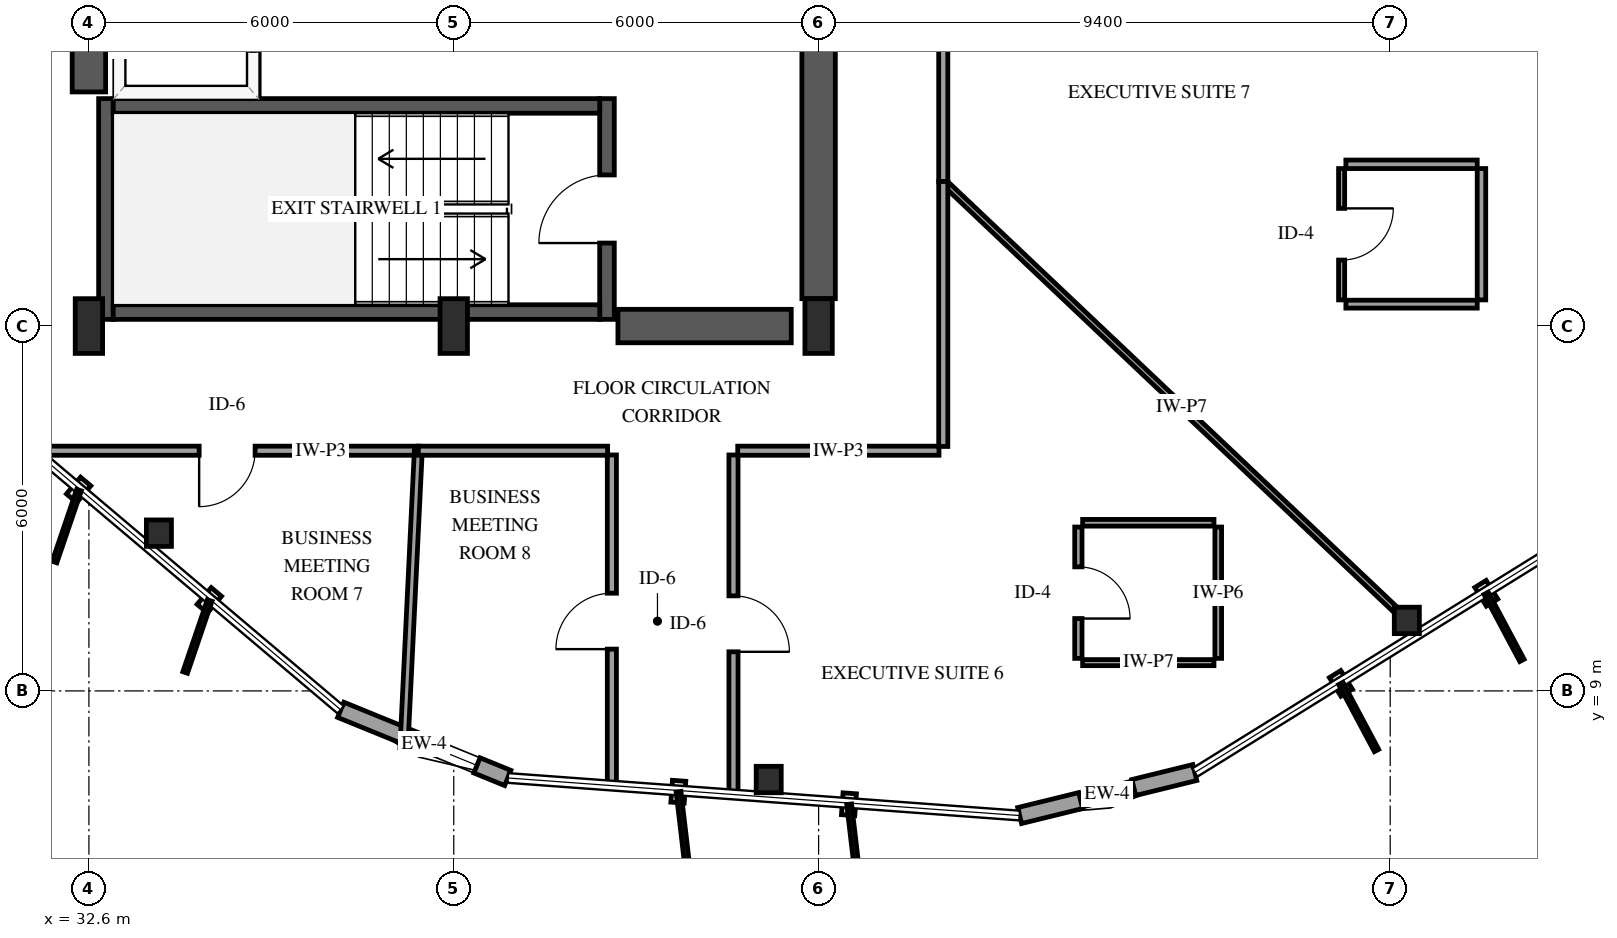
"""IFC4 building model, lengths in metres.
Left out: names, types, materials, properties, quantities, classifications, styles, units other than length and angle.
Written with IfcOpenShell. Run it as: python <this file> out.ifc"""

import sys

from ifc_helpers import new_model, si_unit, direction, frame, frame_2d, origin, origin_2d, place, context, subcontext, project, spatial, rectangle, i_section, extrude, element, fill, save


model = new_model("IFC4")
c1 = context("Model", 3, precision=1e-05, world=origin(), true_north=direction((0.0, 1.0)))
c2 = subcontext(c1, "Body", "Model", "MODEL_VIEW")
j1 = project(units=[si_unit("LENGTHUNIT", "METRE"), si_unit("PLANEANGLEUNIT", "RADIAN")], contexts=[c1])
p1 = place(None, origin())
s1 = spatial("IfcSite", under=j1, at=p1, CompositionType="ELEMENT")
p2 = place(p1, origin())
s2 = spatial("IfcBuilding", under=s1, at=p2, CompositionType="ELEMENT")
p3 = place(p2, frame((0.0, 0.0, 153.4)))
s3 = spatial("IfcBuildingStorey", under=s2, at=p3, CompositionType="ELEMENT", Elevation=153.4)
p4 = place(p3, frame((32.88, 15.11, 0.0), z_axis=(0.0, 0.0, 1.0), x_axis=(0.0, 1.0, 0.0)))
e1 = element("IfcWall", 1, at=p4, inside=s3, PredefinedType="SHEAR", context=c2, shape_type="SweptSolid", body=[
    extrude(rectangle(XDim=3.63, YDim=0.24, at=frame_2d((1.815, 0.0))), origin(), (0.0, 0.0, 1.0), 3.6),
])
p5 = place(p3, frame((41.12, 15.11, 0.0), z_axis=(0.0, 0.0, 1.0), x_axis=(0.0, 1.0, 0.0)))
e2 = element("IfcWall", 2, at=p5, inside=s3, PredefinedType="SHEAR", context=c2, shape_type="SweptSolid", body=[
    extrude(rectangle(XDim=3.63, YDim=0.24, at=frame_2d((1.815, 0.0))), origin(), (0.0, 0.0, 1.0), 3.6),
])
p6 = place(p5, frame((1.255, 0.0, 0.0)))
e3 = element("IfcOpeningElement", 3, at=p6, cuts=e2, PredefinedType="OPENING", context=c2, shape_type="SweptSolid", body=[
    extrude(rectangle(XDim=1.12, YDim=2.15, at=frame_2d((0.56, 1.075))), frame((0.0, 0.13, 0.0), z_axis=(0.0, -1.0, 0.0), x_axis=(1.0, 0.0, 0.0)), (0.0, 0.0, 1.0), 0.26),
])
for number, where, z_axis, x_axis in (
    (4, (33.0, 15.23, 0.0), (0.0, 0.0, 1.0), (1.0, 0.0, 0.0)),
    (5, (33.0, 18.62, 0.0), (0.0, 0.0, 1.0), (1.0, 0.0, 0.0)),
):
    element("IfcWall", number, at=place(p3, frame(where, z_axis=z_axis, x_axis=x_axis)), inside=s3, PredefinedType="SHEAR", context=c2, shape_type="SweptSolid", body=[
        extrude(rectangle(XDim=8.0, YDim=0.24, at=frame_2d((4.0, 0.0))), origin(), (0.0, 0.0, 1.0), 3.6),
    ])
p7 = place(p3, frame((32.6, 18.85, 0.0), z_axis=(0.0, 0.0, 1.0), x_axis=(0.0, 1.0, 0.0)))
e6 = element("IfcWall", 6, at=p7, inside=s3, PredefinedType="SHEAR", context=c2, shape_type="SweptSolid", body=[
    extrude(rectangle(XDim=12.3, YDim=0.55, at=frame_2d((6.15, 0.0))), origin(), (0.0, 0.0, 1.0), 3.6),
])
p8 = place(p3, frame((41.3, 15.0, 0.0), z_axis=(0.0, 0.0, 1.0), x_axis=(1.0, 0.0, 0.0)))
e7 = element("IfcWall", 7, at=p8, inside=s3, PredefinedType="SHEAR", context=c2, shape_type="SweptSolid", body=[
    extrude(rectangle(XDim=2.85, YDim=0.55, at=frame_2d((1.425, 0.0))), origin(), (0.0, 0.0, 1.0), 3.6),
])
p9 = place(p3, frame((44.6, 15.45, 0.0), z_axis=(0.0, 0.0, 1.0), x_axis=(0.0, 1.0, 0.0)))
e8 = element("IfcWall", 8, at=p9, inside=s3, PredefinedType="SHEAR", context=c2, shape_type="SweptSolid", body=[
    extrude(rectangle(XDim=6.35, YDim=0.55, at=frame_2d((3.175, 0.0))), origin(), (0.0, 0.0, 1.0), 3.6),
])
for number, where, z_axis, x_axis in (
    (9, (32.6, 15.0, 0.0), (0.0, 0.0, 1.0), (1.0, 0.0, 0.0)),
    (10, (38.6, 15.0, 0.0), (0.0, 0.0, 1.0), (1.0, 0.0, 0.0)),
    (11, (44.6, 15.0, 0.0), (0.0, 0.0, 1.0), (1.0, 0.0, 0.0)),
):
    element("IfcColumn", number, at=place(p3, frame(where, z_axis=z_axis, x_axis=x_axis)), inside=s3, PredefinedType="PILASTER", context=c2, shape_type="SweptSolid", body=[
        extrude(rectangle(XDim=0.45, YDim=0.9, at=origin_2d()), origin(), (0.0, 0.0, 1.0), 3.6),
    ])
for number, where, z_axis, x_axis in (
    (12, (33.751, 11.594, 0.0), (0.0, 0.0, 1.0), (1.0, 0.0, 0.0)),
    (13, (43.779, 7.542, 0.0), (0.0, 0.0, 1.0), (1.0, 0.0, 0.0)),
    (14, (54.274, 10.159, 0.0), (0.0, 0.0, 1.0), (1.0, 0.0, 0.0)),
):
    element("IfcColumn", number, at=place(p3, frame(where, z_axis=z_axis, x_axis=x_axis)), inside=s3, PredefinedType="COLUMN", context=c2, shape_type="SweptSolid", body=[
        extrude(i_section(OverallWidth=0.412, OverallDepth=0.435, WebThickness=0.036, FlangeThickness=0.057, FilletRadius=0.038, at=origin_2d()), origin(), (0.0, 0.0, 1.0), 3.6),
    ])
p10 = place(p3, frame((36.742, 8.689, 0.0), z_axis=(0.0, 0.0, 1.0), x_axis=(0.925871735267, -0.377837967699, 0.0)))
e15 = element("IfcWall", 15, at=p10, inside=s3, PredefinedType="SOLIDWALL", context=c2, shape_type="SweptSolid", body=[
    extrude(rectangle(XDim=2.967, YDim=0.27, at=frame_2d((1.483, 0.0))), origin(), (0.0, 0.0, 1.0), 2.679),
])
p11 = place(p10, frame((1.519, 0.0, 0.75)))
e16 = element("IfcOpeningElement", 16, at=p11, cuts=e15, PredefinedType="OPENING", context=c2, shape_type="SweptSolid", body=[
    extrude(rectangle(XDim=0.9, YDim=1.5, at=frame_2d((0.45, 0.75))), frame((0.0, 0.145, 0.0), z_axis=(0.0, -1.0, 0.0), x_axis=(1.0, 0.0, 0.0)), (0.0, 0.0, 1.0), 0.29),
])
p12 = place(p3, frame((47.906, 6.95, 0.0), z_axis=(0.0, 0.0, 1.0), x_axis=(0.971145785541, 0.23848661016, 0.0)))
e17 = element("IfcWall", 17, at=p12, inside=s3, PredefinedType="SOLIDWALL", context=c2, shape_type="SweptSolid", body=[
    extrude(rectangle(XDim=2.967, YDim=0.27, at=frame_2d((1.483, 0.0))), origin(), (0.0, 0.0, 1.0), 2.679),
])
p13 = place(p12, frame((1.033, 0.0, 0.75)))
e18 = element("IfcOpeningElement", 18, at=p13, cuts=e17, PredefinedType="OPENING", context=c2, shape_type="SweptSolid", body=[
    extrude(rectangle(XDim=0.9, YDim=1.5, at=frame_2d((0.45, 0.75))), frame((0.0, 0.145, 0.0), z_axis=(0.0, -1.0, 0.0), x_axis=(1.0, 0.0, 0.0)), (0.0, 0.0, 1.0), 0.29),
])
p14 = place(p3, frame((35.3, 18.79, 0.0), z_axis=(0.0, 0.0, 1.0), x_axis=(0.0, 1.0, 0.0)))
e19 = element("IfcWall", 19, at=p14, inside=s3, PredefinedType="SOLIDWALL", context=c2, shape_type="SweptSolid", body=[
    extrude(rectangle(XDim=2.55, YDim=0.2, at=frame_2d((1.275, 0.0))), origin(), (0.0, 0.0, 1.0), 3.3),
])
p15 = place(p14, frame((0.725, 0.0, 0.0)))
e20 = element("IfcOpeningElement", 20, at=p15, cuts=e19, PredefinedType="OPENING", context=c2, shape_type="SweptSolid", body=[
    extrude(rectangle(XDim=1.1, YDim=2.15, at=frame_2d((0.55, 1.075))), frame((0.0, 0.11, 0.0), z_axis=(0.0, -1.0, 0.0), x_axis=(1.0, 0.0, 0.0)), (0.0, 0.0, 1.0), 0.22),
])
p16 = place(p3, frame((46.65, 22.668, 0.0), z_axis=(0.0, 0.0, 1.0), x_axis=(0.960493218243, -0.27830339148, 0.0)))
e21 = element("IfcWall", 21, at=p16, inside=s3, PredefinedType="PARTITIONING", context=c2, shape_type="SweptSolid", body=[
    extrude(rectangle(XDim=15.465, YDim=0.12, at=frame_2d((7.732, 0.0))), origin(), (0.0, 0.0, 1.0), 3.3),
])
p17 = place(p3, frame((46.65, 17.377, 0.0), z_axis=(0.0, 0.0, 1.0), x_axis=(0.726165374711, -0.687520071395, 0.0)))
e22 = element("IfcWall", 22, at=p17, inside=s3, PredefinedType="PARTITIONING", context=c2, shape_type="SweptSolid", body=[
    extrude(rectangle(XDim=10.797, YDim=0.1, at=frame_2d((5.398, 0.0))), origin(), (0.0, 0.0, 1.0), 2.595),
])
p18 = place(p3, frame((38.017, 12.95, 0.0), z_axis=(0.0, 0.0, 1.0), x_axis=(-1.0, 0.0, 0.0)))
e23 = element("IfcWall", 23, at=p18, inside=s3, PredefinedType="PARTITIONING", context=c2, shape_type="SweptSolid", body=[
    extrude(rectangle(XDim=6.317, YDim=0.15, at=frame_2d((3.159, 0.0))), origin(), (0.0, 0.0, 1.0), 3.3),
])
p19 = place(p18, frame((2.684, 0.0, 0.0)))
e24 = element("IfcOpeningElement", 24, at=p19, cuts=e23, PredefinedType="OPENING", context=c2, shape_type="SweptSolid", body=[
    extrude(rectangle(XDim=0.92, YDim=2.12, at=frame_2d((0.46, 1.06))), frame((0.0, 0.085, 0.0), z_axis=(0.0, -1.0, 0.0), x_axis=(1.0, 0.0, 0.0)), (0.0, 0.0, 1.0), 0.17),
])
p20 = place(p3, frame((43.2, 12.88, 0.0), z_axis=(0.0, 0.0, 1.0), x_axis=(0.0, -1.0, 0.0)))
e25 = element("IfcWall", 25, at=p20, inside=s3, PredefinedType="PARTITIONING", context=c2, shape_type="SweptSolid", body=[
    extrude(rectangle(XDim=5.584, YDim=0.15, at=frame_2d((2.792, 0.0))), origin(), (0.0, 0.0, 1.0), 2.595),
])
p21 = place(p20, frame((2.317, 0.0, 0.0)))
e26 = element("IfcOpeningElement", 26, at=p21, cuts=e25, PredefinedType="OPENING", context=c2, shape_type="SweptSolid", body=[
    extrude(rectangle(XDim=0.92, YDim=2.12, at=frame_2d((0.46, 1.06))), frame((0.0, 0.085, 0.0), z_axis=(0.0, -1.0, 0.0), x_axis=(1.0, 0.0, 0.0)), (0.0, 0.0, 1.0), 0.17),
])
p22 = place(p3, frame((41.2, 7.443, 0.0), z_axis=(0.0, 0.0, 1.0), x_axis=(0.0, 1.0, 0.0)))
e27 = element("IfcWall", 27, at=p22, inside=s3, PredefinedType="PARTITIONING", context=c2, shape_type="SweptSolid", body=[
    extrude(rectangle(XDim=5.437, YDim=0.15, at=frame_2d((2.718, 0.0))), origin(), (0.0, 0.0, 1.0), 3.3),
])
p23 = place(p22, frame((2.244, 0.0, 0.0)))
e28 = element("IfcOpeningElement", 28, at=p23, cuts=e27, PredefinedType="OPENING", context=c2, shape_type="SweptSolid", body=[
    extrude(rectangle(XDim=0.92, YDim=2.12, at=frame_2d((0.46, 1.06))), frame((0.0, 0.085, 0.0), z_axis=(0.0, -1.0, 0.0), x_axis=(1.0, 0.0, 0.0)), (0.0, 0.0, 1.0), 0.17),
])
p24 = place(p3, frame((46.65, 22.668, 0.0), z_axis=(0.0, 0.0, 1.0), x_axis=(0.0, -1.0, 0.0)))
e29 = element("IfcWall", 29, at=p24, inside=s3, PredefinedType="PARTITIONING", context=c2, shape_type="SweptSolid", body=[
    extrude(rectangle(XDim=5.291, YDim=0.15, at=frame_2d((2.646, 0.0))), origin(), (0.0, 0.0, 1.0), 3.3),
])
p25 = place(p24, frame((2.171, 0.0, 0.0)))
e30 = element("IfcOpeningElement", 30, at=p25, cuts=e29, PredefinedType="OPENING", context=c2, shape_type="SweptSolid", body=[
    extrude(rectangle(XDim=0.92, YDim=2.12, at=frame_2d((0.46, 1.06))), frame((0.0, 0.085, 0.0), z_axis=(0.0, -1.0, 0.0), x_axis=(1.0, 0.0, 0.0)), (0.0, 0.0, 1.0), 0.17),
])
p26 = place(p3, frame((38.017, 12.95, 0.0), z_axis=(0.0, 0.0, 1.0), x_axis=(-0.048422834173, -0.998826926515, 0.0)))
e31 = element("IfcWall", 31, at=p26, inside=s3, PredefinedType="PARTITIONING", context=c2, shape_type="SweptSolid", body=[
    extrude(rectangle(XDim=4.896, YDim=0.13, at=frame_2d((2.448, 0.0))), origin(), (0.0, 0.0, 1.0), 2.678),
])
p27 = place(p3, frame((46.65, 17.377, 0.0), z_axis=(0.0, 0.0, 1.0), x_axis=(0.0, -1.0, 0.0)))
e32 = element("IfcWall", 32, at=p27, inside=s3, PredefinedType="PARTITIONING", context=c2, shape_type="SweptSolid", body=[
    extrude(rectangle(XDim=4.357, YDim=0.15, at=frame_2d((2.178, 0.0))), origin(), (0.0, 0.0, 1.0), 3.3),
])
p28 = place(p3, frame((46.58, 12.95, 0.0), z_axis=(0.0, 0.0, 1.0), x_axis=(-1.0, 0.0, 0.0)))
e33 = element("IfcWall", 33, at=p28, inside=s3, PredefinedType="PARTITIONING", context=c2, shape_type="SweptSolid", body=[
    extrude(rectangle(XDim=3.31, YDim=0.15, at=frame_2d((1.655, 0.0))), origin(), (0.0, 0.0, 1.0), 3.3),
])
p29 = place(p3, frame((41.13, 12.95, 0.0), z_axis=(0.0, 0.0, 1.0), x_axis=(-1.0, 0.0, 0.0)))
e34 = element("IfcWall", 34, at=p29, inside=s3, PredefinedType="PARTITIONING", context=c2, shape_type="SweptSolid", body=[
    extrude(rectangle(XDim=3.113, YDim=0.15, at=frame_2d((1.556, 0.0))), origin(), (0.0, 0.0, 1.0), 3.3),
])
p30 = place(p3, frame((48.872, 11.695, 0.0), z_axis=(0.0, 0.0, 1.0), x_axis=(0.0, -1.0, 0.0)))
e35 = element("IfcWall", 35, at=p30, inside=s3, PredefinedType="PARTITIONING", context=c2, shape_type="SweptSolid", body=[
    extrude(rectangle(XDim=2.16, YDim=0.12, at=frame_2d((1.08, 0.0))), origin(), (0.0, 0.0, 1.0), 3.3),
])
p31 = place(p30, frame((0.655, 0.0, 0.0)))
e36 = element("IfcOpeningElement", 36, at=p31, cuts=e35, PredefinedType="OPENING", context=c2, shape_type="SweptSolid", body=[
    extrude(rectangle(XDim=0.85, YDim=2.1, at=frame_2d((0.425, 1.05))), frame((0.0, 0.07, 0.0), z_axis=(0.0, -1.0, 0.0), x_axis=(1.0, 0.0, 0.0)), (0.0, 0.0, 1.0), 0.14),
])
p32 = place(p3, frame((51.172, 9.535, 0.0), z_axis=(0.0, 0.0, 1.0), x_axis=(0.0, 1.0, 0.0)))
e37 = element("IfcWall", 37, at=p32, inside=s3, PredefinedType="PARTITIONING", context=c2, shape_type="SweptSolid", body=[
    extrude(rectangle(XDim=2.16, YDim=0.11, at=frame_2d((1.08, 0.0))), origin(), (0.0, 0.0, 1.0), 3.3),
])
p33 = place(p3, frame((53.201, 17.59, 0.0), z_axis=(0.0, 0.0, 1.0), x_axis=(0.0, -1.0, 0.0)))
e38 = element("IfcWall", 38, at=p33, inside=s3, PredefinedType="PARTITIONING", context=c2, shape_type="SweptSolid", body=[
    extrude(rectangle(XDim=2.16, YDim=0.1, at=frame_2d((1.08, 0.0))), origin(), (0.0, 0.0, 1.0), 3.3),
])
p34 = place(p33, frame((0.655, 0.0, 0.0)))
e39 = element("IfcOpeningElement", 39, at=p34, cuts=e38, PredefinedType="OPENING", context=c2, shape_type="SweptSolid", body=[
    extrude(rectangle(XDim=0.85, YDim=2.1, at=frame_2d((0.425, 1.05))), frame((0.0, 0.06, 0.0), z_axis=(0.0, -1.0, 0.0), x_axis=(1.0, 0.0, 0.0)), (0.0, 0.0, 1.0), 0.12),
])
p35 = place(p3, frame((55.501, 15.43, 0.0), z_axis=(0.0, 0.0, 1.0), x_axis=(0.0, 1.0, 0.0)))
e40 = element("IfcWall", 40, at=p35, inside=s3, PredefinedType="PARTITIONING", context=c2, shape_type="SweptSolid", body=[
    extrude(rectangle(XDim=2.16, YDim=0.14, at=frame_2d((1.08, 0.0))), origin(), (0.0, 0.0, 1.0), 3.3),
])
p36 = place(p3, frame((51.102, 11.765, 0.0), z_axis=(0.0, 0.0, 1.0), x_axis=(-1.0, 0.0, 0.0)))
e41 = element("IfcWall", 41, at=p36, inside=s3, PredefinedType="PARTITIONING", context=c2, shape_type="SweptSolid", body=[
    extrude(rectangle(XDim=2.16, YDim=0.11, at=frame_2d((1.08, 0.0))), origin(), (0.0, 0.0, 1.0), 3.3),
])
p37 = place(p3, frame((48.942, 9.465, 0.0), z_axis=(0.0, 0.0, 1.0), x_axis=(1.0, 0.0, 0.0)))
e42 = element("IfcWall", 42, at=p37, inside=s3, PredefinedType="PARTITIONING", context=c2, shape_type="SweptSolid", body=[
    extrude(rectangle(XDim=2.16, YDim=0.1, at=frame_2d((1.08, 0.0))), origin(), (0.0, 0.0, 1.0), 2.511),
])
p38 = place(p3, frame((55.431, 17.66, 0.0), z_axis=(0.0, 0.0, 1.0), x_axis=(-1.0, 0.0, 0.0)))
e43 = element("IfcWall", 43, at=p38, inside=s3, PredefinedType="PARTITIONING", context=c2, shape_type="SweptSolid", body=[
    extrude(rectangle(XDim=2.16, YDim=0.14, at=frame_2d((1.08, 0.0))), origin(), (0.0, 0.0, 1.0), 3.3),
])
p39 = place(p3, frame((53.271, 15.36, 0.0), z_axis=(0.0, 0.0, 1.0), x_axis=(1.0, 0.0, 0.0)))
e44 = element("IfcWall", 44, at=p39, inside=s3, PredefinedType="PARTITIONING", context=c2, shape_type="SweptSolid", body=[
    extrude(rectangle(XDim=2.16, YDim=0.13, at=frame_2d((1.08, 0.0))), origin(), (0.0, 0.0, 1.0), 3.3),
])
p40 = place(p11, origin())
e45 = element("IfcWindow", 45, at=p40, inside=s3, PartitioningType="SINGLE_PANEL", PredefinedType="WINDOW", context=c2, shape_type="SweptSolid", body=[
    extrude(rectangle(XDim=0.9, YDim=1.5, at=frame_2d((0.45, 0.75))), frame((0.0, 0.03, 0.0), z_axis=(0.0, -1.0, 0.0), x_axis=(1.0, 0.0, 0.0)), (0.0, 0.0, 1.0), 0.06),
])
fill(e16, e45)
p41 = place(p13, origin())
e46 = element("IfcWindow", 46, at=p41, inside=s3, PartitioningType="SINGLE_PANEL", PredefinedType="WINDOW", context=c2, shape_type="SweptSolid", body=[
    extrude(rectangle(XDim=0.9, YDim=1.5, at=frame_2d((0.45, 0.75))), frame((0.0, 0.03, 0.0), z_axis=(0.0, -1.0, 0.0), x_axis=(1.0, 0.0, 0.0)), (0.0, 0.0, 1.0), 0.06),
])
fill(e18, e46)
p42 = place(p6, origin())
e47 = element("IfcDoor", 47, at=p42, inside=s3, OperationType="SINGLE_SWING_LEFT", PredefinedType="DOOR", context=c2, shape_type="SweptSolid", body=[
    extrude(rectangle(XDim=1.12, YDim=2.15, at=frame_2d((0.56, 1.075))), frame((0.0, 0.025, 0.0), z_axis=(0.0, -1.0, 0.0), x_axis=(1.0, 0.0, 0.0)), (0.0, 0.0, 1.0), 0.05),
])
fill(e3, e47)
p43 = place(p19, origin())
e48 = element("IfcDoor", 48, at=p43, inside=s3, OperationType="SINGLE_SWING_RIGHT", PredefinedType="DOOR", context=c2, shape_type="SweptSolid", body=[
    extrude(rectangle(XDim=0.92, YDim=2.12, at=frame_2d((0.46, 1.06))), frame((0.0, 0.025, 0.0), z_axis=(0.0, -1.0, 0.0), x_axis=(1.0, 0.0, 0.0)), (0.0, 0.0, 1.0), 0.05),
])
fill(e24, e48)
p44 = place(p21, origin())
e49 = element("IfcDoor", 49, at=p44, inside=s3, OperationType="SINGLE_SWING_RIGHT", PredefinedType="DOOR", context=c2, shape_type="SweptSolid", body=[
    extrude(rectangle(XDim=0.92, YDim=2.12, at=frame_2d((0.46, 1.06))), frame((0.0, 0.025, 0.0), z_axis=(0.0, -1.0, 0.0), x_axis=(1.0, 0.0, 0.0)), (0.0, 0.0, 1.0), 0.05),
])
fill(e26, e49)
p45 = place(p23, origin())
e50 = element("IfcDoor", 50, at=p45, inside=s3, OperationType="SINGLE_SWING_LEFT", PredefinedType="DOOR", context=c2, shape_type="SweptSolid", body=[
    extrude(rectangle(XDim=0.92, YDim=2.12, at=frame_2d((0.46, 1.06))), frame((0.0, 0.025, 0.0), z_axis=(0.0, -1.0, 0.0), x_axis=(1.0, 0.0, 0.0)), (0.0, 0.0, 1.0), 0.05),
])
fill(e28, e50)
p46 = place(p31, origin())
e51 = element("IfcDoor", 51, at=p46, inside=s3, OperationType="SINGLE_SWING_RIGHT", PredefinedType="DOOR", context=c2, shape_type="SweptSolid", body=[
    extrude(rectangle(XDim=0.85, YDim=2.1, at=frame_2d((0.425, 1.05))), frame((0.0, 0.025, 0.0), z_axis=(0.0, -1.0, 0.0), x_axis=(1.0, 0.0, 0.0)), (0.0, 0.0, 1.0), 0.05),
])
fill(e36, e51)
p47 = place(p34, origin())
e52 = element("IfcDoor", 52, at=p47, inside=s3, OperationType="SINGLE_SWING_LEFT", PredefinedType="DOOR", context=c2, shape_type="SweptSolid", body=[
    extrude(rectangle(XDim=0.85, YDim=2.1, at=frame_2d((0.425, 1.05))), frame((0.0, 0.025, 0.0), z_axis=(0.0, -1.0, 0.0), x_axis=(1.0, 0.0, 0.0)), (0.0, 0.0, 1.0), 0.05),
])
fill(e39, e52)
save(model, sys.argv[1])
